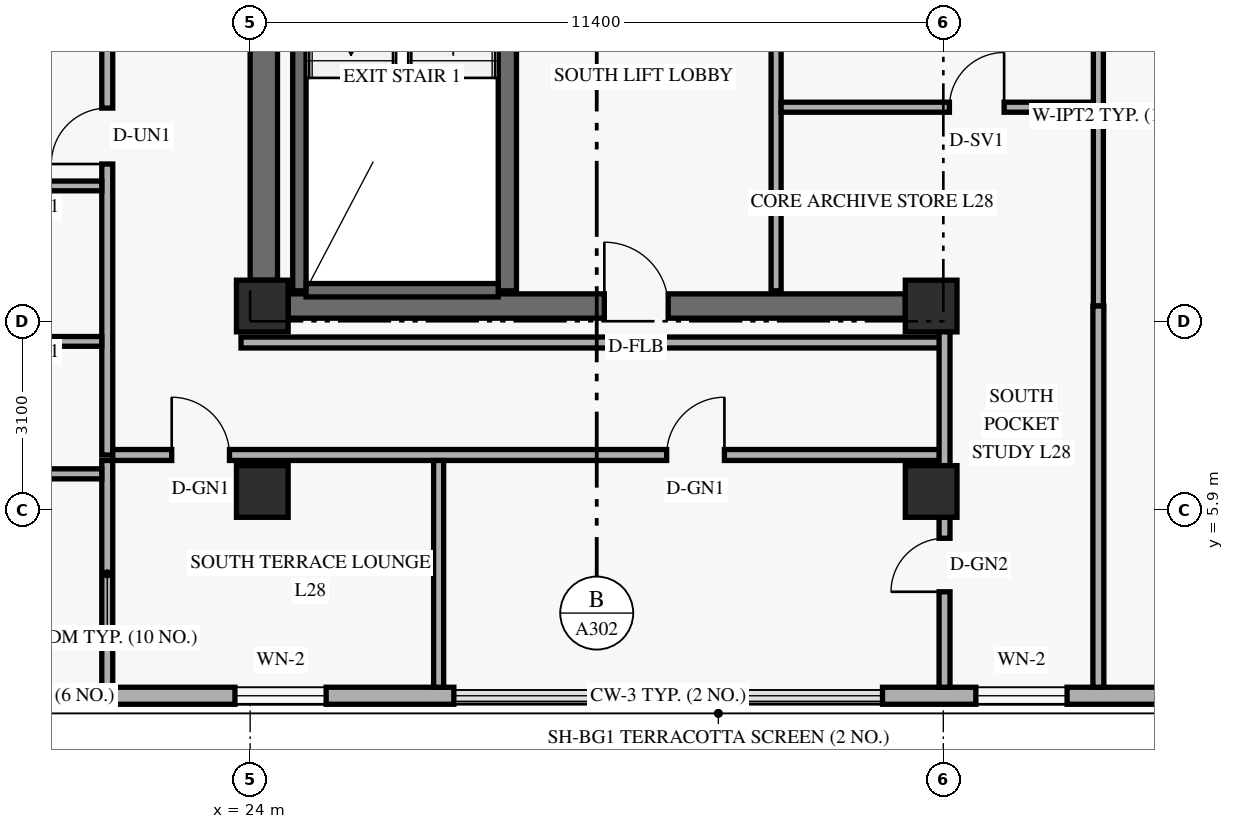
"""IFC4 building model, lengths in metres.
Left out: names, types, materials, properties, quantities, classifications, styles, units other than length and angle.
Written with IfcOpenShell. Run it as: python <this file> out.ifc"""

import sys

from ifc_helpers import new_model, si_unit, direction, frame, frame_2d, origin, origin_2d, place, context, subcontext, project, spatial, rectangle, extrude, element, fill, save


model = new_model("IFC4")
c1 = context("Model", 3, precision=1e-05, world=origin(), true_north=direction((0.0, 1.0)))
c2 = subcontext(c1, "Body", "Model", "MODEL_VIEW")
j1 = project(units=[si_unit("LENGTHUNIT", "METRE"), si_unit("PLANEANGLEUNIT", "RADIAN")], contexts=[c1])
p1 = place(None, origin())
s1 = spatial("IfcSite", under=j1, at=p1, CompositionType="ELEMENT")
p2 = place(p1, origin())
s2 = spatial("IfcBuilding", under=s1, at=p2, CompositionType="ELEMENT")
p3 = place(p2, frame((0.0, 0.0, 109.8)))
s3 = spatial("IfcBuildingStorey", under=s2, at=p3, CompositionType="ELEMENT", Elevation=109.8)
p4 = place(p3, frame((24.225, 9.675, 0.0), z_axis=(0.0, 0.0, 1.0), x_axis=(0.0, 1.0, 0.0)))
e1 = element("IfcWall", 1, at=p4, inside=s3, PredefinedType="SHEAR", context=c2, shape_type="SweptSolid", body=[
    extrude(rectangle(XDim=7.45, YDim=0.45, at=frame_2d((3.725, 0.0))), origin(), (0.0, 0.0, 1.0), 2.749),
])
p5 = place(p3, frame((24.625, 9.25, 0.0), z_axis=(0.0, 0.0, 1.0), x_axis=(1.0, 0.0, 0.0)))
e2 = element("IfcWall", 2, at=p5, inside=s3, PredefinedType="SHEAR", context=c2, shape_type="SweptSolid", body=[
    extrude(rectangle(XDim=10.15, YDim=0.4, at=frame_2d((5.075, 0.0))), origin(), (0.0, 0.0, 1.0), 3.36),
])
p6 = place(p5, frame((5.2, 0.0, 0.0)))
e3 = element("IfcOpeningElement", 3, at=p6, cuts=e2, PredefinedType="OPENING", context=c2, shape_type="SweptSolid", body=[
    extrude(rectangle(XDim=1.05, YDim=2.15, at=frame_2d((0.525, 1.075))), frame((0.0, 0.21, 0.0), z_axis=(0.0, -1.0, 0.0), x_axis=(1.0, 0.0, 0.0)), (0.0, 0.0, 1.0), 0.42),
])
p7 = place(p3, frame((24.81, 9.5, 0.0), z_axis=(0.0, 0.0, 1.0), x_axis=(0.0, 1.0, 0.0)))
e4 = element("IfcWall", 4, at=p7, inside=s3, PredefinedType="SHEAR", context=c2, shape_type="SweptSolid", body=[
    extrude(rectangle(XDim=7.76, YDim=0.22, at=frame_2d((3.88, 0.0))), origin(), (0.0, 0.0, 1.0), 3.36),
])
p8 = place(p3, frame((28.23, 9.5, 0.0), z_axis=(0.0, 0.0, 1.0), x_axis=(0.0, 1.0, 0.0)))
e5 = element("IfcWall", 5, at=p8, inside=s3, PredefinedType="SHEAR", context=c2, shape_type="SweptSolid", body=[
    extrude(rectangle(XDim=7.76, YDim=0.3, at=frame_2d((3.88, 0.0))), origin(), (0.0, 0.0, 1.0), 3.36),
])
p9 = place(p3, frame((24.92, 9.51, 0.0), z_axis=(0.0, 0.0, 1.0), x_axis=(1.0, 0.0, 0.0)))
e6 = element("IfcWall", 6, at=p9, inside=s3, PredefinedType="SHEAR", context=c2, shape_type="SweptSolid", body=[
    extrude(rectangle(XDim=3.16, YDim=0.22, at=frame_2d((1.58, 0.0))), origin(), (0.0, 0.0, 1.0), 3.36),
])
for number, where, z_axis, x_axis in (
    (7, (24.2, 6.2, 0.0), (0.0, 0.0, 1.0), (1.0, 0.0, 0.0)),
    (8, (24.2, 9.25, 0.0), (0.0, 0.0, 1.0), (1.0, 0.0, 0.0)),
    (9, (35.2, 6.2, 0.0), (0.0, 0.0, 1.0), (1.0, 0.0, 0.0)),
    (10, (35.2, 9.25, 0.0), (0.0, 0.0, 1.0), (1.0, 0.0, 0.0)),
):
    element("IfcColumn", number, at=place(p3, frame(where, z_axis=z_axis, x_axis=x_axis)), inside=s3, PredefinedType="COLUMN", context=c2, shape_type="SweptSolid", body=[
        extrude(rectangle(XDim=0.85, YDim=0.85, at=origin_2d()), origin(), (0.0, 0.0, 1.0), 3.6),
    ])
p10 = place(p3, frame((13.42, 2.84, 0.0), z_axis=(0.0, 0.0, 1.0), x_axis=(1.0, 0.0, 0.0)))
e11 = element("IfcWall", 11, at=p10, inside=s3, PredefinedType="SOLIDWALL", context=c2, shape_type="SweptSolid", body=[
    extrude(rectangle(XDim=13.93, YDim=0.28, at=frame_2d((6.965, 0.0))), origin(), (0.0, 0.0, 1.0), 3.36),
])
p11 = place(p10, frame((3.365, 0.0, 0.85)))
e12 = element("IfcOpeningElement", 12, at=p11, cuts=e11, PredefinedType="OPENING", context=c2, shape_type="SweptSolid", body=[
    extrude(rectangle(XDim=1.5, YDim=1.55, at=frame_2d((0.75, 0.775))), frame((0.0, 0.15, 0.0), z_axis=(0.0, -1.0, 0.0), x_axis=(1.0, 0.0, 0.0)), (0.0, 0.0, 1.0), 0.3),
])
p12 = place(p10, frame((10.33, 0.0, 0.85)))
e13 = element("IfcOpeningElement", 13, at=p12, cuts=e11, PredefinedType="OPENING", context=c2, shape_type="SweptSolid", body=[
    extrude(rectangle(XDim=1.5, YDim=1.55, at=frame_2d((0.75, 0.775))), frame((0.0, 0.15, 0.0), z_axis=(0.0, -1.0, 0.0), x_axis=(1.0, 0.0, 0.0)), (0.0, 0.0, 1.0), 0.3),
])
p13 = place(p3, frame((34.4, 2.84, 0.0), z_axis=(0.0, 0.0, 1.0), x_axis=(1.0, 0.0, 0.0)))
e14 = element("IfcWall", 14, at=p13, inside=s3, PredefinedType="SOLIDWALL", context=c2, shape_type="SweptSolid", body=[
    extrude(rectangle(XDim=15.58, YDim=0.28, at=frame_2d((7.79, 0.0))), origin(), (0.0, 0.0, 1.0), 3.36),
])
p14 = place(p13, frame((1.535, 0.0, 0.85)))
e15 = element("IfcOpeningElement", 15, at=p14, cuts=e14, PredefinedType="OPENING", context=c2, shape_type="SweptSolid", body=[
    extrude(rectangle(XDim=1.5, YDim=1.55, at=frame_2d((0.75, 0.775))), frame((0.0, 0.15, 0.0), z_axis=(0.0, -1.0, 0.0), x_axis=(1.0, 0.0, 0.0)), (0.0, 0.0, 1.0), 0.3),
])
p15 = place(p13, frame((6.625, 0.0, 0.85)))
e16 = element("IfcOpeningElement", 16, at=p15, cuts=e14, PredefinedType="OPENING", context=c2, shape_type="SweptSolid", body=[
    extrude(rectangle(XDim=1.5, YDim=1.55, at=frame_2d((0.75, 0.775))), frame((0.0, 0.15, 0.0), z_axis=(0.0, -1.0, 0.0), x_axis=(1.0, 0.0, 0.0)), (0.0, 0.0, 1.0), 0.3),
])
p16 = place(p13, frame((11.5, 0.0, 0.85)))
e17 = element("IfcOpeningElement", 17, at=p16, cuts=e14, PredefinedType="OPENING", context=c2, shape_type="SweptSolid", body=[
    extrude(rectangle(XDim=1.2, YDim=1.5, at=frame_2d((0.6, 0.75))), frame((0.0, 0.15, 0.0), z_axis=(0.0, -1.0, 0.0), x_axis=(1.0, 0.0, 0.0)), (0.0, 0.0, 1.0), 0.3),
])
p17 = place(p13, frame((13.54, 0.0, 0.85)))
e18 = element("IfcOpeningElement", 18, at=p17, cuts=e14, PredefinedType="OPENING", context=c2, shape_type="SweptSolid", body=[
    extrude(rectangle(XDim=1.5, YDim=1.55, at=frame_2d((0.75, 0.775))), frame((0.0, 0.15, 0.0), z_axis=(0.0, -1.0, 0.0), x_axis=(1.0, 0.0, 0.0)), (0.0, 0.0, 1.0), 0.3),
])
p18 = place(p3, frame((32.65, 9.5, 0.0), z_axis=(0.0, 0.0, 1.0), x_axis=(0.0, 1.0, 0.0)))
e19 = element("IfcWall", 19, at=p18, inside=s3, PredefinedType="PARTITIONING", context=c2, shape_type="SweptSolid", body=[
    extrude(rectangle(XDim=6.08, YDim=0.165, at=frame_2d((3.04, 0.0))), origin(), (0.0, 0.0, 1.0), 3.36),
])
p19 = place(p3, frame((37.95, 9.25, 0.0), z_axis=(0.0, 0.0, 1.0), x_axis=(0.0, 1.0, 0.0)))
e20 = element("IfcWall", 20, at=p19, inside=s3, PredefinedType="PARTITIONING", context=c2, shape_type="SweptSolid", body=[
    extrude(rectangle(XDim=6.248, YDim=0.165, at=frame_2d((3.124, 0.0))), origin(), (0.0, 0.0, 1.0), 2.731),
])
p20 = place(p3, frame((32.732, 12.52, 0.0), z_axis=(0.0, 0.0, 1.0), x_axis=(1.0, 0.0, 0.0)))
e21 = element("IfcWall", 21, at=p20, inside=s3, PredefinedType="PARTITIONING", context=c2, shape_type="SweptSolid", body=[
    extrude(rectangle(XDim=5.135, YDim=0.165, at=frame_2d((2.567, 0.0))), origin(), (0.0, 0.0, 1.0), 2.731),
])
p21 = place(p20, frame((2.768, 0.0, 0.0)))
e22 = element("IfcOpeningElement", 22, at=p21, cuts=e21, PredefinedType="OPENING", context=c2, shape_type="SweptSolid", body=[
    extrude(rectangle(XDim=0.9, YDim=2.1, at=frame_2d((0.45, 1.05))), frame((0.0, 0.093, 0.0), z_axis=(0.0, -1.0, 0.0), x_axis=(1.0, 0.0, 0.0)), (0.0, 0.0, 1.0), 0.185),
])
p22 = place(p3, frame((21.65, 6.8, 0.0), z_axis=(0.0, 0.0, 1.0), x_axis=(0.0, 1.0, 0.0)))
e23 = element("IfcWall", 23, at=p22, inside=s3, PredefinedType="STANDARD", context=c2, shape_type="SweptSolid", body=[
    extrude(rectangle(XDim=34.4, YDim=0.18, at=frame_2d((17.2, 0.0))), origin(), (0.0, 0.0, 1.0), 2.731),
])
p23 = place(p22, frame((4.785, 0.0, 0.0)))
e24 = element("IfcOpeningElement", 24, at=p23, cuts=e23, PredefinedType="OPENING", context=c2, shape_type="SweptSolid", body=[
    extrude(rectangle(XDim=0.92, YDim=2.15, at=frame_2d((0.46, 1.075))), frame((0.0, 0.1, 0.0), z_axis=(0.0, -1.0, 0.0), x_axis=(1.0, 0.0, 0.0)), (0.0, 0.0, 1.0), 0.2),
])
p24 = place(p22, frame((15.384, 0.0, 0.0)))
e25 = element("IfcOpeningElement", 25, at=p24, cuts=e23, PredefinedType="OPENING", context=c2, shape_type="SweptSolid", body=[
    extrude(rectangle(XDim=0.92, YDim=2.15, at=frame_2d((0.46, 1.075))), frame((0.0, 0.1, 0.0), z_axis=(0.0, -1.0, 0.0), x_axis=(1.0, 0.0, 0.0)), (0.0, 0.0, 1.0), 0.2),
])
p25 = place(p22, frame((28.41, 0.0, 0.0)))
e26 = element("IfcOpeningElement", 26, at=p25, cuts=e23, PredefinedType="OPENING", context=c2, shape_type="SweptSolid", body=[
    extrude(rectangle(XDim=0.92, YDim=2.15, at=frame_2d((0.46, 1.075))), frame((0.0, 0.1, 0.0), z_axis=(0.0, -1.0, 0.0), x_axis=(1.0, 0.0, 0.0)), (0.0, 0.0, 1.0), 0.2),
])
p26 = place(p3, frame((21.74, 6.8, 0.0), z_axis=(0.0, 0.0, 1.0), x_axis=(1.0, 0.0, 0.0)))
e27 = element("IfcWall", 27, at=p26, inside=s3, PredefinedType="STANDARD", context=c2, shape_type="SweptSolid", body=[
    extrude(rectangle(XDim=13.68, YDim=0.18, at=frame_2d((6.84, 0.0))), origin(), (0.0, 0.0, 1.0), 2.731),
])
p27 = place(p26, frame((0.97, 0.0, 0.0)))
e28 = element("IfcOpeningElement", 28, at=p27, cuts=e27, PredefinedType="OPENING", context=c2, shape_type="SweptSolid", body=[
    extrude(rectangle(XDim=0.95, YDim=2.15, at=frame_2d((0.475, 1.075))), frame((0.0, 0.1, 0.0), z_axis=(0.0, -1.0, 0.0), x_axis=(1.0, 0.0, 0.0)), (0.0, 0.0, 1.0), 0.2),
])
p28 = place(p26, frame((9.11, 0.0, 0.0)))
e29 = element("IfcOpeningElement", 29, at=p28, cuts=e27, PredefinedType="OPENING", context=c2, shape_type="SweptSolid", body=[
    extrude(rectangle(XDim=0.95, YDim=2.15, at=frame_2d((0.475, 1.075))), frame((0.0, 0.1, 0.0), z_axis=(0.0, -1.0, 0.0), x_axis=(1.0, 0.0, 0.0)), (0.0, 0.0, 1.0), 0.2),
])
p29 = place(p3, frame((23.85, 8.65, 0.0), z_axis=(0.0, 0.0, 1.0), x_axis=(1.0, 0.0, 0.0)))
e30 = element("IfcWall", 30, at=p29, inside=s3, PredefinedType="STANDARD", context=c2, shape_type="SweptSolid", body=[
    extrude(rectangle(XDim=11.57, YDim=0.18, at=frame_2d((5.785, 0.0))), origin(), (0.0, 0.0, 1.0), 2.731),
])
p30 = place(p3, frame((21.65, 2.98, 0.0), z_axis=(0.0, 0.0, 1.0), x_axis=(0.0, 1.0, 0.0)))
e31 = element("IfcWall", 31, at=p30, inside=s3, PredefinedType="PARTITIONING", context=c2, shape_type="SweptSolid", body=[
    extrude(rectangle(XDim=3.73, YDim=0.18, at=frame_2d((1.865, 0.0))), origin(), (0.0, 0.0, 1.0), 2.809),
])
p31 = place(p3, frame((35.42, 2.98, 0.0), z_axis=(0.0, 0.0, 1.0), x_axis=(0.0, 1.0, 0.0)))
e32 = element("IfcWall", 32, at=p31, inside=s3, PredefinedType="PARTITIONING", context=c2, shape_type="SweptSolid", body=[
    extrude(rectangle(XDim=6.27, YDim=0.18, at=frame_2d((3.135, 0.0))), origin(), (0.0, 0.0, 1.0), 2.731),
])
p32 = place(p31, frame((1.57, 0.0, 0.0)))
e33 = element("IfcOpeningElement", 33, at=p32, cuts=e32, PredefinedType="OPENING", context=c2, shape_type="SweptSolid", body=[
    extrude(rectangle(XDim=0.88, YDim=2.12, at=frame_2d((0.44, 1.06))), frame((0.0, 0.1, 0.0), z_axis=(0.0, -1.0, 0.0), x_axis=(1.0, 0.0, 0.0)), (0.0, 0.0, 1.0), 0.2),
])
p33 = place(p3, frame((37.95, 2.98, 0.0), z_axis=(0.0, 0.0, 1.0), x_axis=(0.0, 1.0, 0.0)))
e34 = element("IfcWall", 34, at=p33, inside=s3, PredefinedType="PARTITIONING", context=c2, shape_type="SweptSolid", body=[
    extrude(rectangle(XDim=6.27, YDim=0.18, at=frame_2d((3.135, 0.0))), origin(), (0.0, 0.0, 1.0), 2.731),
])
p34 = place(p3, frame((10.08, 6.49, 0.0), z_axis=(0.0, 0.0, 1.0), x_axis=(1.0, 0.0, 0.0)))
e35 = element("IfcWall", 35, at=p34, inside=s3, PredefinedType="PARTITIONING", context=c2, shape_type="SweptSolid", body=[
    extrude(rectangle(XDim=11.48, YDim=0.165, at=frame_2d((5.74, 0.0))), origin(), (0.0, 0.0, 1.0), 3.36),
])
p35 = place(p34, frame((2.41, 0.0, 0.0)))
e36 = element("IfcOpeningElement", 36, at=p35, cuts=e35, PredefinedType="OPENING", context=c2, shape_type="SweptSolid", body=[
    extrude(rectangle(XDim=0.9, YDim=2.14, at=frame_2d((0.45, 1.07))), frame((0.0, 0.093, 0.0), z_axis=(0.0, -1.0, 0.0), x_axis=(1.0, 0.0, 0.0)), (0.0, 0.0, 1.0), 0.185),
])
p36 = place(p3, frame((16.03, 11.226, 0.0), z_axis=(0.0, 0.0, 1.0), x_axis=(1.0, 0.0, 0.0)))
e37 = element("IfcWall", 37, at=p36, inside=s3, PredefinedType="PLUMBINGWALL", context=c2, shape_type="SweptSolid", body=[
    extrude(rectangle(XDim=5.53, YDim=0.16, at=frame_2d((2.765, 0.0))), origin(), (0.0, 0.0, 1.0), 2.731),
])
p37 = place(p3, frame((16.19, 8.668, 0.0), z_axis=(0.0, 0.0, 1.0), x_axis=(1.0, 0.0, 0.0)))
e38 = element("IfcWall", 38, at=p37, inside=s3, PredefinedType="PLUMBINGWALL", context=c2, shape_type="SweptSolid", body=[
    extrude(rectangle(XDim=5.37, YDim=0.16, at=frame_2d((2.685, 0.0))), origin(), (0.0, 0.0, 1.0), 2.731),
])
p38 = place(p3, frame((27.1, 2.98, 0.0), z_axis=(0.0, 0.0, 1.0), x_axis=(0.0, 1.0, 0.0)))
e39 = element("IfcWall", 39, at=p38, inside=s3, PredefinedType="PARTITIONING", context=c2, shape_type="SweptSolid", body=[
    extrude(rectangle(XDim=3.73, YDim=0.165, at=frame_2d((1.865, 0.0))), origin(), (0.0, 0.0, 1.0), 2.809),
])
p39 = place(p12, origin())
e40 = element("IfcWindow", 40, at=p39, inside=s3, PartitioningType="SINGLE_PANEL", PredefinedType="WINDOW", context=c2, shape_type="SweptSolid", body=[
    extrude(rectangle(XDim=1.5, YDim=1.55, at=frame_2d((0.75, 0.775))), frame((0.0, 0.03, 0.0), z_axis=(0.0, -1.0, 0.0), x_axis=(1.0, 0.0, 0.0)), (0.0, 0.0, 1.0), 0.06),
])
fill(e13, e40)
p40 = place(p14, origin())
e41 = element("IfcWindow", 41, at=p40, inside=s3, PartitioningType="SINGLE_PANEL", PredefinedType="WINDOW", context=c2, shape_type="SweptSolid", body=[
    extrude(rectangle(XDim=1.5, YDim=1.55, at=frame_2d((0.75, 0.775))), frame((0.0, 0.03, 0.0), z_axis=(0.0, -1.0, 0.0), x_axis=(1.0, 0.0, 0.0)), (0.0, 0.0, 1.0), 0.06),
])
fill(e15, e41)
p41 = place(p21, origin())
e42 = element("IfcDoor", 42, at=p41, inside=s3, OperationType="SINGLE_SWING_RIGHT", PredefinedType="DOOR", context=c2, shape_type="SweptSolid", body=[
    extrude(rectangle(XDim=0.9, YDim=2.1, at=frame_2d((0.45, 1.05))), frame((0.0, 0.025, 0.0), z_axis=(0.0, -1.0, 0.0), x_axis=(1.0, 0.0, 0.0)), (0.0, 0.0, 1.0), 0.05),
])
fill(e22, e42)
p42 = place(p6, origin())
e43 = element("IfcDoor", 43, at=p42, inside=s3, OperationType="SINGLE_SWING_LEFT", PredefinedType="DOOR", context=c2, shape_type="SweptSolid", body=[
    extrude(rectangle(XDim=1.05, YDim=2.15, at=frame_2d((0.525, 1.075))), frame((0.0, 0.025, 0.0), z_axis=(0.0, -1.0, 0.0), x_axis=(1.0, 0.0, 0.0)), (0.0, 0.0, 1.0), 0.05),
])
fill(e3, e43)
p43 = place(p32, origin())
e44 = element("IfcDoor", 44, at=p43, inside=s3, OperationType="SINGLE_SWING_LEFT", PredefinedType="DOOR", context=c2, shape_type="SweptSolid", body=[
    extrude(rectangle(XDim=0.88, YDim=2.12, at=frame_2d((0.44, 1.06))), frame((0.0, 0.025, 0.0), z_axis=(0.0, -1.0, 0.0), x_axis=(1.0, 0.0, 0.0)), (0.0, 0.0, 1.0), 0.05),
])
fill(e33, e44)
p44 = place(p23, origin())
e45 = element("IfcDoor", 45, at=p44, inside=s3, OperationType="SINGLE_SWING_LEFT", PredefinedType="DOOR", context=c2, shape_type="SweptSolid", body=[
    extrude(rectangle(XDim=0.92, YDim=2.15, at=frame_2d((0.46, 1.075))), frame((0.0, 0.025, 0.0), z_axis=(0.0, -1.0, 0.0), x_axis=(1.0, 0.0, 0.0)), (0.0, 0.0, 1.0), 0.05),
])
fill(e24, e45)
p45 = place(p27, origin())
e46 = element("IfcDoor", 46, at=p45, inside=s3, OperationType="SINGLE_SWING_LEFT", PredefinedType="DOOR", context=c2, shape_type="SweptSolid", body=[
    extrude(rectangle(XDim=0.95, YDim=2.15, at=frame_2d((0.475, 1.075))), frame((0.0, 0.025, 0.0), z_axis=(0.0, -1.0, 0.0), x_axis=(1.0, 0.0, 0.0)), (0.0, 0.0, 1.0), 0.05),
])
fill(e28, e46)
p46 = place(p28, origin())
e47 = element("IfcDoor", 47, at=p46, inside=s3, OperationType="SINGLE_SWING_RIGHT", PredefinedType="DOOR", context=c2, shape_type="SweptSolid", body=[
    extrude(rectangle(XDim=0.95, YDim=2.15, at=frame_2d((0.475, 1.075))), frame((0.0, 0.025, 0.0), z_axis=(0.0, -1.0, 0.0), x_axis=(1.0, 0.0, 0.0)), (0.0, 0.0, 1.0), 0.05),
])
fill(e29, e47)
save(model, sys.argv[1])
